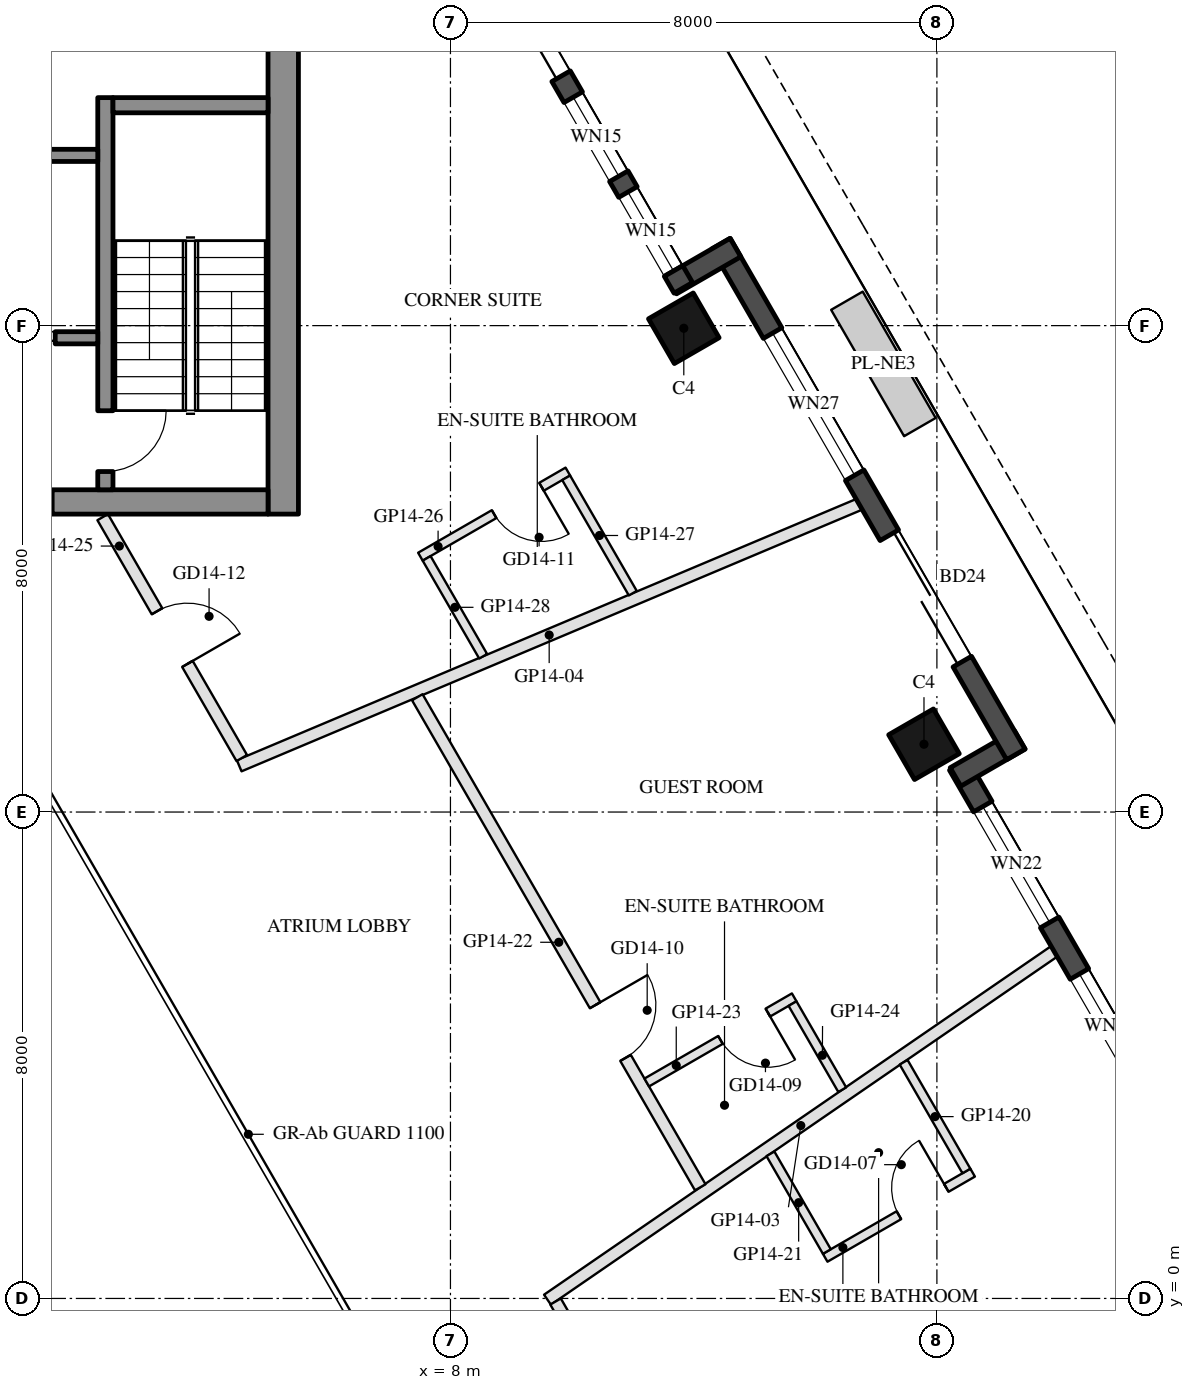
"""IFC4 building model, lengths in metres.
Left out: names, types, materials, properties, quantities, classifications, styles, units other than length and angle.
Written with IfcOpenShell. Run it as: python <this file> out.ifc"""

import sys

from ifc_helpers import new_model, si_unit, direction, frame, frame_2d, origin, origin_2d, place, context, subcontext, project, spatial, rectangle, hollow_rectangle, extrude, element, fill, save


model = new_model("IFC4")
c1 = context("Model", 3, precision=1e-05, world=origin(), true_north=direction((0.0, 1.0)))
c2 = subcontext(c1, "Body", "Model", "MODEL_VIEW")
j1 = project(units=[si_unit("LENGTHUNIT", "METRE"), si_unit("PLANEANGLEUNIT", "RADIAN")], contexts=[c1])
p1 = place(None, origin())
s1 = spatial("IfcSite", under=j1, at=p1, CompositionType="ELEMENT")
p2 = place(p1, origin())
s2 = spatial("IfcBuilding", under=s1, at=p2, CompositionType="ELEMENT")
p3 = place(p2, frame((0.0, 0.0, 161.4)))
s3 = spatial("IfcBuildingStorey", under=s2, at=p3, CompositionType="ELEMENT", Elevation=161.4)
for number, where, z_axis, x_axis in (
    (1, (15.788, 9.115, 0.0), (0.0, 0.0, 1.0), (-0.5, 0.866, 0.0)),
    (2, (11.838, 15.957, 0.0), (0.0, 0.0, 1.0), (-0.5, 0.866, 0.0)),
):
    element("IfcColumn", number, at=place(p3, frame(where, z_axis=z_axis, x_axis=x_axis)), inside=s3, PredefinedType="COLUMN", context=c2, shape_type="SweptSolid", body=[
        extrude(hollow_rectangle(XDim=0.85, YDim=0.85, WallThickness=0.04, at=origin_2d()), origin(), (0.0, 0.0, 1.0), 3.7),
    ])
p4 = place(p3, frame((19.729, 2.938, 0.0), z_axis=(0.0, 0.0, 1.0), x_axis=(-0.499976430342, 0.866039011305, 0.0)))
e3 = element("IfcWall", 3, at=p4, inside=s3, PredefinedType="SOLIDWALL", context=c2, shape_type="SweptSolid", body=[
    extrude(rectangle(XDim=6.74, YDim=0.35, at=frame_2d((3.37, 0.0))), origin(), (0.0, 0.0, 1.0), 3.55),
])
p5 = place(p4, frame((0.77, 0.0, 0.3)))
e4 = element("IfcOpeningElement", 4, at=p5, cuts=e3, PredefinedType="OPENING", context=c2, shape_type="SweptSolid", body=[
    extrude(rectangle(XDim=2.0, YDim=2.65, at=frame_2d((1.0, 1.325))), frame((0.0, 0.185, 0.0), z_axis=(0.0, -1.0, 0.0), x_axis=(1.0, 0.0, 0.0)), (0.0, 0.0, 1.0), 0.37),
])
p6 = place(p4, frame((3.749, 0.0, 0.3)))
e5 = element("IfcOpeningElement", 5, at=p6, cuts=e3, PredefinedType="OPENING", context=c2, shape_type="SweptSolid", body=[
    extrude(rectangle(XDim=2.2, YDim=2.65, at=frame_2d((1.1, 1.325))), frame((0.0, 0.185, 0.0), z_axis=(0.0, -1.0, 0.0), x_axis=(1.0, 0.0, 0.0)), (0.0, 0.0, 1.0), 0.37),
])
p7 = place(p3, frame((16.306, 8.577, 0.0), z_axis=(0.0, 0.0, 1.0), x_axis=(0.866092288191, 0.499884134912, 0.0)))
e6 = element("IfcWall", 6, at=p7, inside=s3, PredefinedType="SOLIDWALL", context=c2, shape_type="SweptSolid", body=[
    extrude(rectangle(XDim=1.22, YDim=0.35, at=frame_2d((0.61, 0.0))), origin(), (0.0, 0.0, 1.0), 3.55),
])
p8 = place(p3, frame((17.299, 8.948, 0.0), z_axis=(0.0, 0.0, 1.0), x_axis=(-0.500010041276, 0.866019606374, 0.0)))
e7 = element("IfcWall", 7, at=p8, inside=s3, PredefinedType="SOLIDWALL", context=c2, shape_type="SweptSolid", body=[
    extrude(rectangle(XDim=9.7, YDim=0.35, at=frame_2d((4.85, 0.0))), origin(), (0.0, 0.0, 1.0), 3.55),
])
p9 = place(p8, frame((1.762, 0.0, 0.0)))
e8 = element("IfcOpeningElement", 8, at=p9, cuts=e7, PredefinedType="OPENING", context=c2, shape_type="SweptSolid", body=[
    extrude(rectangle(XDim=2.4, YDim=2.4, at=frame_2d((1.2, 1.2))), frame((0.0, 0.185, 0.0), z_axis=(0.0, -1.0, 0.0), x_axis=(1.0, 0.0, 0.0)), (0.0, 0.0, 1.0), 0.37),
])
p10 = place(p8, frame((5.301, 0.0, 0.3)))
e9 = element("IfcOpeningElement", 9, at=p10, cuts=e7, PredefinedType="OPENING", context=c2, shape_type="SweptSolid", body=[
    extrude(rectangle(XDim=2.7, YDim=2.65, at=frame_2d((1.35, 1.325))), frame((0.0, 0.185, 0.0), z_axis=(0.0, -1.0, 0.0), x_axis=(1.0, 0.0, 0.0)), (0.0, 0.0, 1.0), 0.37),
])
p11 = place(p3, frame((12.688, 17.284, 0.0), z_axis=(0.0, 0.0, 1.0), x_axis=(-0.865955602162, -0.500120880472, 0.0)))
e10 = element("IfcWall", 10, at=p11, inside=s3, PredefinedType="SOLIDWALL", context=c2, shape_type="SweptSolid", body=[
    extrude(rectangle(XDim=1.22, YDim=0.35, at=frame_2d((0.61, 0.0))), origin(), (0.0, 0.0, 1.0), 3.55),
])
p12 = place(p3, frame((11.829, 16.621, 0.0), z_axis=(0.0, 0.0, 1.0), x_axis=(-0.500003597184, 0.866023326939, 0.0)))
e11 = element("IfcWall", 11, at=p12, inside=s3, PredefinedType="SOLIDWALL", context=c2, shape_type="SweptSolid", body=[
    extrude(rectangle(XDim=6.74, YDim=0.35, at=frame_2d((3.37, 0.0))), origin(), (0.0, 0.0, 1.0), 3.55),
])
p13 = place(p12, frame((4.02, 0.0, 0.0)))
e12 = element("IfcOpeningElement", 12, at=p13, cuts=e11, PredefinedType="OPENING", context=c2, shape_type="SweptSolid", body=[
    extrude(rectangle(XDim=2.4, YDim=2.4, at=frame_2d((1.2, 1.2))), frame((0.0, 0.185, 0.0), z_axis=(0.0, -1.0, 0.0), x_axis=(1.0, 0.0, 0.0)), (0.0, 0.0, 1.0), 0.37),
])
p14 = place(p12, frame((0.32, 0.0, 0.3)))
e13 = element("IfcOpeningElement", 13, at=p14, cuts=e11, PredefinedType="OPENING", context=c2, shape_type="SweptSolid", body=[
    extrude(rectangle(XDim=1.5, YDim=2.65, at=frame_2d((0.75, 1.325))), frame((0.0, 0.185, 0.0), z_axis=(0.0, -1.0, 0.0), x_axis=(1.0, 0.0, 0.0)), (0.0, 0.0, 1.0), 0.37),
])
p15 = place(p12, frame((2.12, 0.0, 0.3)))
e14 = element("IfcOpeningElement", 14, at=p15, cuts=e11, PredefinedType="OPENING", context=c2, shape_type="SweptSolid", body=[
    extrude(rectangle(XDim=1.5, YDim=2.65, at=frame_2d((0.75, 1.325))), frame((0.0, 0.185, 0.0), z_axis=(0.0, -1.0, 0.0), x_axis=(1.0, 0.0, 0.0)), (0.0, 0.0, 1.0), 0.37),
])
p16 = place(p3, frame((5.25, 12.9, 0.0), z_axis=(0.0, 0.0, 1.0), x_axis=(0.0, 1.0, 0.0)))
e15 = element("IfcWall", 15, at=p16, inside=s3, PredefinedType="SHEAR", context=c2, shape_type="SweptSolid", body=[
    extrude(rectangle(XDim=14.837, YDim=0.5, at=frame_2d((7.418, 0.0))), origin(), (0.0, 0.0, 1.0), 3.5),
])
p17 = place(p3, frame((5.0, 13.1, 0.0), z_axis=(0.0, 0.0, 1.0), x_axis=(-1.0, 0.0, 0.0)))
e16 = element("IfcWall", 16, at=p17, inside=s3, PredefinedType="SHEAR", context=c2, shape_type="SweptSolid", body=[
    extrude(rectangle(XDim=10.0, YDim=0.4, at=frame_2d((5.0, 0.0))), origin(), (0.0, 0.0, 1.0), 3.5),
])
p18 = place(p17, frame((3.55, 0.0, 0.0)))
e17 = element("IfcOpeningElement", 17, at=p18, cuts=e16, PredefinedType="OPENING", context=c2, shape_type="SweptSolid", body=[
    extrude(rectangle(XDim=1.1, YDim=2.1, at=frame_2d((0.55, 1.05))), frame((0.0, 0.21, 0.0), z_axis=(0.0, -1.0, 0.0), x_axis=(1.0, 0.0, 0.0)), (0.0, 0.0, 1.0), 0.42),
])
p19 = place(p17, frame((5.85, 0.0, 0.0)))
e18 = element("IfcOpeningElement", 18, at=p19, cuts=e16, PredefinedType="OPENING", context=c2, shape_type="SweptSolid", body=[
    extrude(rectangle(XDim=1.4, YDim=2.1, at=frame_2d((0.7, 1.05))), frame((0.0, 0.21, 0.0), z_axis=(0.0, -1.0, 0.0), x_axis=(1.0, 0.0, 0.0)), (0.0, 0.0, 1.0), 0.42),
])
p20 = place(p3, frame((2.325, 13.3, 0.0), z_axis=(0.0, 0.0, 1.0), x_axis=(0.0, 1.0, 0.0)))
e19 = element("IfcWall", 19, at=p20, inside=s3, PredefinedType="SHEAR", context=c2, shape_type="SweptSolid", body=[
    extrude(rectangle(XDim=6.45, YDim=0.25, at=frame_2d((3.225, 0.0))), origin(), (0.0, 0.0, 1.0), 3.5),
])
p21 = place(p20, frame((0.3, 0.0, 0.0)))
e20 = element("IfcOpeningElement", 20, at=p21, cuts=e19, PredefinedType="OPENING", context=c2, shape_type="SweptSolid", body=[
    extrude(rectangle(XDim=1.0, YDim=2.1, at=frame_2d((0.5, 1.05))), frame((0.0, 0.135, 0.0), z_axis=(0.0, -1.0, 0.0), x_axis=(1.0, 0.0, 0.0)), (0.0, 0.0, 1.0), 0.27),
])
p22 = place(p3, frame((5.0, 19.625, 0.0), z_axis=(0.0, 0.0, 1.0), x_axis=(-1.0, 0.0, 0.0)))
e21 = element("IfcWall", 21, at=p22, inside=s3, PredefinedType="SHEAR", context=c2, shape_type="SweptSolid", body=[
    extrude(rectangle(XDim=2.55, YDim=0.25, at=frame_2d((1.275, 0.0))), origin(), (0.0, 0.0, 1.0), 3.5),
])
p23 = place(p3, frame((2.2, 18.8, 0.0), z_axis=(0.0, 0.0, 1.0), x_axis=(-1.0, 0.0, 0.0)))
e22 = element("IfcWall", 22, at=p23, inside=s3, PredefinedType="SHEAR", context=c2, shape_type="SweptSolid", body=[
    extrude(rectangle(XDim=2.8, YDim=0.2, at=frame_2d((1.4, 0.0))), origin(), (0.0, 0.0, 1.0), 3.5),
])
p24 = place(p3, frame((2.2, 15.8, 0.0), z_axis=(0.0, 0.0, 1.0), x_axis=(-1.0, 0.0, 0.0)))
e23 = element("IfcWall", 23, at=p24, inside=s3, PredefinedType="SHEAR", context=c2, shape_type="SweptSolid", body=[
    extrude(rectangle(XDim=2.8, YDim=0.2, at=frame_2d((1.4, 0.0))), origin(), (0.0, 0.0, 1.0), 3.5),
])
p25 = place(p24, frame((0.7, 0.0, 0.0)))
e24 = element("IfcOpeningElement", 24, at=p25, cuts=e23, PredefinedType="OPENING", context=c2, shape_type="SweptSolid", body=[
    extrude(rectangle(XDim=1.2, YDim=2.1, at=frame_2d((0.6, 1.05))), frame((0.0, 0.11, 0.0), z_axis=(0.0, -1.0, 0.0), x_axis=(1.0, 0.0, 0.0)), (0.0, 0.0, 1.0), 0.22),
])
p26 = place(p3, frame((17.928, 5.708, 0.0), z_axis=(0.0, 0.0, 1.0), x_axis=(-0.824041924199, -0.566528822887, 0.0)))
e25 = element("IfcWall", 25, at=p26, inside=s3, PredefinedType="PARTITIONING", context=c2, shape_type="SweptSolid", body=[
    extrude(rectangle(XDim=10.111, YDim=0.2, at=frame_2d((5.056, 0.0))), origin(), (0.0, 0.0, 1.0), 2.95),
])
p27 = place(p3, frame((14.722, 13.061, 0.0), z_axis=(0.0, 0.0, 1.0), x_axis=(-0.921447968583, -0.388501790465, 0.0)))
e26 = element("IfcWall", 26, at=p27, inside=s3, PredefinedType="PARTITIONING", context=c2, shape_type="SweptSolid", body=[
    extrude(rectangle(XDim=11.066, YDim=0.2, at=frame_2d((5.533, 0.0))), origin(), (0.0, 0.0, 1.0), 2.95),
])
p28 = place(p3, frame((9.729, -0.051, 0.0), z_axis=(0.0, 0.0, 1.0), x_axis=(0.500005339912, -0.866022320763, 0.0)))
e27 = element("IfcWall", 27, at=p28, inside=s3, PredefinedType="PARTITIONING", context=c2, shape_type="SweptSolid", body=[
    extrude(rectangle(XDim=5.08, YDim=0.2, at=frame_2d((2.54, 0.0))), origin(), (0.0, 0.0, 1.0), 2.95),
])
p29 = place(p28, frame((2.04, 0.0, 0.0)))
e28 = element("IfcOpeningElement", 28, at=p29, cuts=e27, PredefinedType="OPENING", context=c2, shape_type="SweptSolid", body=[
    extrude(rectangle(XDim=1.0, YDim=2.1, at=frame_2d((0.5, 1.05))), frame((0.0, 0.11, 0.0), z_axis=(0.0, -1.0, 0.0), x_axis=(1.0, 0.0, 0.0)), (0.0, 0.0, 1.0), 0.22),
])
p30 = place(p3, frame((14.163, 0.669, 0.0), z_axis=(0.0, 0.0, 1.0), x_axis=(0.866056369097, 0.49994636267, 0.0)))
e29 = element("IfcWall", 29, at=p30, inside=s3, PredefinedType="PARTITIONING", context=c2, shape_type="SweptSolid", body=[
    extrude(rectangle(XDim=2.8, YDim=0.15, at=frame_2d((1.4, 0.0))), origin(), (0.0, 0.0, 1.0), 3.55),
])
p31 = place(p30, frame((1.4, 0.0, 0.0)))
e30 = element("IfcOpeningElement", 30, at=p31, cuts=e29, PredefinedType="OPENING", context=c2, shape_type="SweptSolid", body=[
    extrude(rectangle(XDim=0.9, YDim=2.1, at=frame_2d((0.45, 1.05))), frame((0.0, 0.085, 0.0), z_axis=(0.0, -1.0, 0.0), x_axis=(1.0, 0.0, 0.0)), (0.0, 0.0, 1.0), 0.17),
])
p32 = place(p3, frame((16.485, 2.096, 0.0), z_axis=(0.0, 0.0, 1.0), x_axis=(-0.499991955492, 0.866030048233, 0.0)))
e31 = element("IfcWall", 31, at=p32, inside=s3, PredefinedType="PARTITIONING", context=c2, shape_type="SweptSolid", body=[
    extrude(rectangle(XDim=2.065, YDim=0.15, at=frame_2d((1.032, 0.0))), origin(), (0.0, 0.0, 1.0), 3.55),
])
p33 = place(p3, frame((14.19, 0.771, 0.0), z_axis=(0.0, 0.0, 1.0), x_axis=(-0.499972951856, 0.866041019474, 0.0)))
e32 = element("IfcWall", 32, at=p33, inside=s3, PredefinedType="PARTITIONING", context=c2, shape_type="SweptSolid", body=[
    extrude(rectangle(XDim=1.856, YDim=0.15, at=frame_2d((0.928, 0.0))), origin(), (0.0, 0.0, 1.0), 3.55),
])
p34 = place(p3, frame((7.455, 9.888, 0.0), z_axis=(0.0, 0.0, 1.0), x_axis=(0.499995688794, -0.866027892846, 0.0)))
e33 = element("IfcWall", 33, at=p34, inside=s3, PredefinedType="PARTITIONING", context=c2, shape_type="SweptSolid", body=[
    extrude(rectangle(XDim=9.307, YDim=0.2, at=frame_2d((4.654, 0.0))), origin(), (0.0, 0.0, 1.0), 2.95),
])
p35 = place(p34, frame((5.849, 0.0, 0.0)))
e34 = element("IfcOpeningElement", 34, at=p35, cuts=e33, PredefinedType="OPENING", context=c2, shape_type="SweptSolid", body=[
    extrude(rectangle(XDim=1.0, YDim=2.1, at=frame_2d((0.5, 1.05))), frame((0.0, 0.11, 0.0), z_axis=(0.0, -1.0, 0.0), x_axis=(1.0, 0.0, 0.0)), (0.0, 0.0, 1.0), 0.22),
])
p36 = place(p3, frame((13.653, 4.952, 0.0), z_axis=(0.0, 0.0, 1.0), x_axis=(-0.866034573852, -0.49998411664, 0.0)))
e35 = element("IfcWall", 35, at=p36, inside=s3, PredefinedType="PARTITIONING", context=c2, shape_type="SweptSolid", body=[
    extrude(rectangle(XDim=2.8, YDim=0.15, at=frame_2d((1.4, 0.0))), origin(), (0.0, 0.0, 1.0), 3.55),
])
p37 = place(p36, frame((0.5, 0.0, 0.0)))
e36 = element("IfcOpeningElement", 36, at=p37, cuts=e35, PredefinedType="OPENING", context=c2, shape_type="SweptSolid", body=[
    extrude(rectangle(XDim=0.9, YDim=2.1, at=frame_2d((0.45, 1.05))), frame((0.0, 0.085, 0.0), z_axis=(0.0, -1.0, 0.0), x_axis=(1.0, 0.0, 0.0)), (0.0, 0.0, 1.0), 0.17),
])
p38 = place(p3, frame((14.443, 3.433, 0.0), z_axis=(0.0, 0.0, 1.0), x_axis=(-0.499976608306, 0.866038908564, 0.0)))
e37 = element("IfcWall", 37, at=p38, inside=s3, PredefinedType="PARTITIONING", context=c2, shape_type="SweptSolid", body=[
    extrude(rectangle(XDim=1.635, YDim=0.15, at=frame_2d((0.818, 0.0))), origin(), (0.0, 0.0, 1.0), 2.95),
])
p39 = place(p3, frame((2.281, 12.85, 0.0), z_axis=(0.0, 0.0, 1.0), x_axis=(0.500030411023, -0.86600784526, 0.0)))
e38 = element("IfcWall", 38, at=p39, inside=s3, PredefinedType="PARTITIONING", context=c2, shape_type="SweptSolid", body=[
    extrude(rectangle(XDim=4.575, YDim=0.2, at=frame_2d((2.288, 0.0))), origin(), (0.0, 0.0, 1.0), 2.95),
])
p40 = place(p39, frame((1.787, 0.0, 0.0)))
e39 = element("IfcOpeningElement", 39, at=p40, cuts=e38, PredefinedType="OPENING", context=c2, shape_type="SweptSolid", body=[
    extrude(rectangle(XDim=1.0, YDim=2.1, at=frame_2d((0.5, 1.05))), frame((0.0, 0.11, 0.0), z_axis=(0.0, -1.0, 0.0), x_axis=(1.0, 0.0, 0.0)), (0.0, 0.0, 1.0), 0.22),
])
p41 = place(p3, frame((9.931, 13.6, 0.0), z_axis=(0.0, 0.0, 1.0), x_axis=(-0.866034573852, -0.49998411664, 0.0)))
e40 = element("IfcWall", 40, at=p41, inside=s3, PredefinedType="PARTITIONING", context=c2, shape_type="SweptSolid", body=[
    extrude(rectangle(XDim=2.8, YDim=0.15, at=frame_2d((1.4, 0.0))), origin(), (0.0, 0.0, 1.0), 3.55),
])
p42 = place(p41, frame((0.5, 0.0, 0.0)))
e41 = element("IfcOpeningElement", 41, at=p42, cuts=e40, PredefinedType="OPENING", context=c2, shape_type="SweptSolid", body=[
    extrude(rectangle(XDim=0.9, YDim=2.1, at=frame_2d((0.45, 1.05))), frame((0.0, 0.085, 0.0), z_axis=(0.0, -1.0, 0.0), x_axis=(1.0, 0.0, 0.0)), (0.0, 0.0, 1.0), 0.17),
])
p43 = place(p3, frame((10.999, 11.6, 0.0), z_axis=(0.0, 0.0, 1.0), x_axis=(-0.499937856693, 0.866061279267, 0.0)))
e42 = element("IfcWall", 42, at=p43, inside=s3, PredefinedType="PARTITIONING", context=c2, shape_type="SweptSolid", body=[
    extrude(rectangle(XDim=2.191, YDim=0.15, at=frame_2d((1.096, 0.0))), origin(), (0.0, 0.0, 1.0), 3.55),
])
p44 = place(p3, frame((8.538, 10.562, 0.0), z_axis=(0.0, 0.0, 1.0), x_axis=(-0.500036928615, 0.866004081989, 0.0)))
e43 = element("IfcWall", 43, at=p44, inside=s3, PredefinedType="PARTITIONING", context=c2, shape_type="SweptSolid", body=[
    extrude(rectangle(XDim=1.859, YDim=0.15, at=frame_2d((0.93, 0.0))), origin(), (0.0, 0.0, 1.0), 3.55),
])
p45 = place(p5, origin())
e44 = element("IfcWindow", 44, at=p45, inside=s3, PartitioningType="SINGLE_PANEL", PredefinedType="WINDOW", context=c2, shape_type="SweptSolid", body=[
    extrude(rectangle(XDim=2.0, YDim=2.65, at=frame_2d((1.0, 1.325))), frame((0.0, 0.03, 0.0), z_axis=(0.0, -1.0, 0.0), x_axis=(1.0, 0.0, 0.0)), (0.0, 0.0, 1.0), 0.06),
])
fill(e4, e44)
p46 = place(p6, origin())
e45 = element("IfcWindow", 45, at=p46, inside=s3, PartitioningType="SINGLE_PANEL", PredefinedType="WINDOW", context=c2, shape_type="SweptSolid", body=[
    extrude(rectangle(XDim=2.2, YDim=2.65, at=frame_2d((1.1, 1.325))), frame((0.0, 0.03, 0.0), z_axis=(0.0, -1.0, 0.0), x_axis=(1.0, 0.0, 0.0)), (0.0, 0.0, 1.0), 0.06),
])
fill(e5, e45)
p47 = place(p9, frame((2.4, 0.0, 0.0), z_axis=(0.0, 0.0, 1.0), x_axis=(-1.0, 0.0, 0.0)))
e46 = element("IfcDoor", 46, at=p47, inside=s3, OperationType="SLIDING_TO_LEFT", PredefinedType="DOOR", context=c2, shape_type="SweptSolid", body=[
    extrude(rectangle(XDim=2.4, YDim=2.4, at=frame_2d((1.2, 1.2))), frame((0.0, 0.025, 0.0), z_axis=(0.0, -1.0, 0.0), x_axis=(1.0, 0.0, 0.0)), (0.0, 0.0, 1.0), 0.05),
])
fill(e8, e46)
p48 = place(p10, origin())
e47 = element("IfcWindow", 47, at=p48, inside=s3, PartitioningType="SINGLE_PANEL", PredefinedType="WINDOW", context=c2, shape_type="SweptSolid", body=[
    extrude(rectangle(XDim=2.7, YDim=2.65, at=frame_2d((1.35, 1.325))), frame((0.0, 0.03, 0.0), z_axis=(0.0, -1.0, 0.0), x_axis=(1.0, 0.0, 0.0)), (0.0, 0.0, 1.0), 0.06),
])
fill(e9, e47)
p49 = place(p13, frame((2.4, 0.0, 0.0), z_axis=(0.0, 0.0, 1.0), x_axis=(-1.0, 0.0, 0.0)))
e48 = element("IfcDoor", 48, at=p49, inside=s3, OperationType="SLIDING_TO_LEFT", PredefinedType="DOOR", context=c2, shape_type="SweptSolid", body=[
    extrude(rectangle(XDim=2.4, YDim=2.4, at=frame_2d((1.2, 1.2))), frame((0.0, 0.025, 0.0), z_axis=(0.0, -1.0, 0.0), x_axis=(1.0, 0.0, 0.0)), (0.0, 0.0, 1.0), 0.05),
])
fill(e12, e48)
p50 = place(p14, origin())
e49 = element("IfcWindow", 49, at=p50, inside=s3, PartitioningType="SINGLE_PANEL", PredefinedType="WINDOW", context=c2, shape_type="SweptSolid", body=[
    extrude(rectangle(XDim=1.5, YDim=2.65, at=frame_2d((0.75, 1.325))), frame((0.0, 0.03, 0.0), z_axis=(0.0, -1.0, 0.0), x_axis=(1.0, 0.0, 0.0)), (0.0, 0.0, 1.0), 0.06),
])
fill(e13, e49)
p51 = place(p15, origin())
e50 = element("IfcWindow", 50, at=p51, inside=s3, PartitioningType="SINGLE_PANEL", PredefinedType="WINDOW", context=c2, shape_type="SweptSolid", body=[
    extrude(rectangle(XDim=1.5, YDim=2.65, at=frame_2d((0.75, 1.325))), frame((0.0, 0.03, 0.0), z_axis=(0.0, -1.0, 0.0), x_axis=(1.0, 0.0, 0.0)), (0.0, 0.0, 1.0), 0.06),
])
fill(e14, e50)
p52 = place(p25, origin())
e51 = element("IfcDoor", 51, at=p52, inside=s3, OperationType="DOUBLE_DOOR_SLIDING", PredefinedType="DOOR", context=c2, shape_type="SweptSolid", body=[
    extrude(rectangle(XDim=1.2, YDim=2.1, at=frame_2d((0.6, 1.05))), frame((0.0, 0.025, 0.0), z_axis=(0.0, -1.0, 0.0), x_axis=(1.0, 0.0, 0.0)), (0.0, 0.0, 1.0), 0.05),
])
fill(e24, e51)
p53 = place(p21, frame((1.0, 0.0, 0.0), z_axis=(0.0, 0.0, 1.0), x_axis=(-1.0, 0.0, 0.0)))
e52 = element("IfcDoor", 52, at=p53, inside=s3, OperationType="SINGLE_SWING_LEFT", PredefinedType="DOOR", context=c2, shape_type="SweptSolid", body=[
    extrude(rectangle(XDim=1.0, YDim=2.1, at=frame_2d((0.5, 1.05))), frame((0.0, 0.025, 0.0), z_axis=(0.0, -1.0, 0.0), x_axis=(1.0, 0.0, 0.0)), (0.0, 0.0, 1.0), 0.05),
])
fill(e20, e52)
p54 = place(p31, origin())
e53 = element("IfcDoor", 53, at=p54, inside=s3, OperationType="SINGLE_SWING_RIGHT", PredefinedType="DOOR", context=c2, shape_type="SweptSolid", body=[
    extrude(rectangle(XDim=0.9, YDim=2.1, at=frame_2d((0.45, 1.05))), frame((0.0, 0.025, 0.0), z_axis=(0.0, -1.0, 0.0), x_axis=(1.0, 0.0, 0.0)), (0.0, 0.0, 1.0), 0.05),
])
fill(e30, e53)
p55 = place(p37, origin())
e54 = element("IfcDoor", 54, at=p55, inside=s3, OperationType="SINGLE_SWING_LEFT", PredefinedType="DOOR", context=c2, shape_type="SweptSolid", body=[
    extrude(rectangle(XDim=0.9, YDim=2.1, at=frame_2d((0.45, 1.05))), frame((0.0, 0.025, 0.0), z_axis=(0.0, -1.0, 0.0), x_axis=(1.0, 0.0, 0.0)), (0.0, 0.0, 1.0), 0.05),
])
fill(e36, e54)
p56 = place(p35, origin())
e55 = element("IfcDoor", 55, at=p56, inside=s3, OperationType="SINGLE_SWING_LEFT", PredefinedType="DOOR", context=c2, shape_type="SweptSolid", body=[
    extrude(rectangle(XDim=1.0, YDim=2.1, at=frame_2d((0.5, 1.05))), frame((0.0, 0.025, 0.0), z_axis=(0.0, -1.0, 0.0), x_axis=(1.0, 0.0, 0.0)), (0.0, 0.0, 1.0), 0.05),
])
fill(e34, e55)
p57 = place(p42, origin())
e56 = element("IfcDoor", 56, at=p57, inside=s3, OperationType="SINGLE_SWING_LEFT", PredefinedType="DOOR", context=c2, shape_type="SweptSolid", body=[
    extrude(rectangle(XDim=0.9, YDim=2.1, at=frame_2d((0.45, 1.05))), frame((0.0, 0.025, 0.0), z_axis=(0.0, -1.0, 0.0), x_axis=(1.0, 0.0, 0.0)), (0.0, 0.0, 1.0), 0.05),
])
fill(e41, e56)
p58 = place(p40, origin())
e57 = element("IfcDoor", 57, at=p58, inside=s3, OperationType="SINGLE_SWING_RIGHT", PredefinedType="DOOR", context=c2, shape_type="SweptSolid", body=[
    extrude(rectangle(XDim=1.0, YDim=2.1, at=frame_2d((0.5, 1.05))), frame((0.0, 0.025, 0.0), z_axis=(0.0, -1.0, 0.0), x_axis=(1.0, 0.0, 0.0)), (0.0, 0.0, 1.0), 0.05),
])
fill(e39, e57)
save(model, sys.argv[1])
